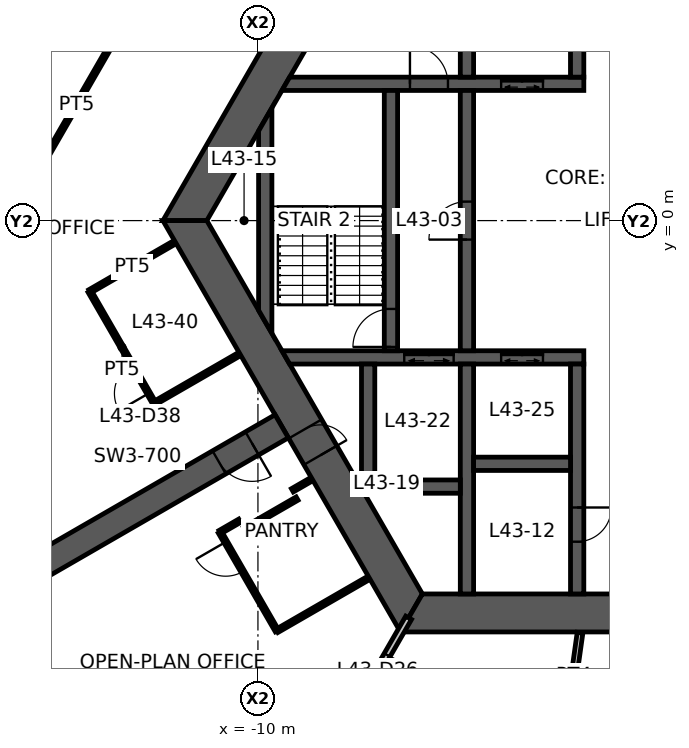
"""IFC4 building model, lengths in metres.
Left out: names, types, materials, properties, quantities, classifications, styles, units other than length and angle.
Written with IfcOpenShell. Run it as: python <this file> out.ifc"""

import sys

from ifc_helpers import new_model, si_unit, direction, frame, frame_2d, origin, place, context, subcontext, project, spatial, polyline, rectangle, outline, extrude, element, fill, save


model = new_model("IFC4")
c1 = context("Model", 3, precision=1e-05, world=origin(), true_north=direction((0.0, 1.0)))
c2 = subcontext(c1, "Body", "Model", "MODEL_VIEW")
j1 = project(units=[si_unit("LENGTHUNIT", "METRE"), si_unit("PLANEANGLEUNIT", "RADIAN")], contexts=[c1])
p1 = place(None, origin())
s1 = spatial("IfcSite", under=j1, at=p1, CompositionType="ELEMENT")
p2 = place(p1, origin())
s2 = spatial("IfcBuilding", under=s1, at=p2, CompositionType="ELEMENT")
p3 = place(p2, frame((0.0, 0.0, 172.1)))
s3 = spatial("IfcBuildingStorey", under=s2, at=p3, CompositionType="ELEMENT", Elevation=172.1)
p4 = place(p3, frame((-5.961, 10.325, 0.0), z_axis=(0.0, 0.0, 1.0), x_axis=(-0.500004296715, -0.866022923061, 0.0)))
e1 = element("IfcWall", 1, at=p4, inside=s3, PredefinedType="SHEAR", context=c2, shape_type="SweptSolid", body=[
    extrude(outline(polyline([(-0.289, -0.5), (4.494, -0.5), (5.494, -0.5), (12.211, -0.5), (11.634, 0.5), (5.494, 0.5), (4.494, 0.5), (0.289, 0.5), (-0.289, -0.5)])), origin(), (0.0, 0.0, 1.0), 3.9),
])
p5 = place(p4, frame((4.494, 0.0, 0.0)))
e2 = element("IfcOpeningElement", 2, at=p5, cuts=e1, PredefinedType="OPENING", context=c2, shape_type="SweptSolid", body=[
    extrude(rectangle(XDim=1.0, YDim=2.1, at=frame_2d((0.5, 1.05))), frame((0.0, 0.51, 0.0), z_axis=(0.0, -1.0, 0.0), x_axis=(1.0, 0.0, 0.0)), (0.0, 0.0, 1.0), 1.02),
])
p6 = place(p3, frame((-11.922, 0.0, 0.0), z_axis=(0.0, 0.0, 1.0), x_axis=(0.500004296715, -0.866022923061, 0.0)))
e3 = element("IfcWall", 3, at=p6, inside=s3, PredefinedType="SHEAR", context=c2, shape_type="SweptSolid", body=[
    extrude(outline(polyline([(-0.289, -0.5), (6.331, -0.5), (7.131, -0.5), (12.211, -0.5), (11.634, 0.5), (7.131, 0.5), (6.331, 0.5), (0.289, 0.5), (-0.289, -0.5)])), origin(), (0.0, 0.0, 1.0), 3.9),
])
p7 = place(p6, frame((6.331, 0.0, 0.0)))
e4 = element("IfcOpeningElement", 4, at=p7, cuts=e3, PredefinedType="OPENING", context=c2, shape_type="SweptSolid", body=[
    extrude(rectangle(XDim=0.8, YDim=2.1, at=frame_2d((0.4, 1.05))), frame((0.0, 0.51, 0.0), z_axis=(0.0, -1.0, 0.0), x_axis=(1.0, 0.0, 0.0)), (0.0, 0.0, 1.0), 1.02),
])
p8 = place(p3, frame((-5.961, -10.325, 0.0), z_axis=(0.0, 0.0, 1.0), x_axis=(1.0, 0.0, 0.0)))
e5 = element("IfcWall", 5, at=p8, inside=s3, PredefinedType="SHEAR", context=c2, shape_type="SweptSolid", body=[
    extrude(outline(polyline([(-0.289, -0.5), (5.461, -0.5), (6.461, -0.5), (12.211, -0.5), (11.634, 0.5), (6.461, 0.5), (5.461, 0.5), (0.289, 0.5), (-0.289, -0.5)])), origin(), (0.0, 0.0, 1.0), 3.9),
])
p9 = place(p8, frame((5.461, 0.0, 0.0)))
e6 = element("IfcOpeningElement", 6, at=p9, cuts=e5, PredefinedType="OPENING", context=c2, shape_type="SweptSolid", body=[
    extrude(rectangle(XDim=1.0, YDim=2.1, at=frame_2d((0.5, 1.05))), frame((0.0, 0.51, 0.0), z_axis=(0.0, -1.0, 0.0), x_axis=(1.0, 0.0, 0.0)), (0.0, 0.0, 1.0), 1.02),
])
p10 = place(p3, frame((-9.375, -5.413, 0.0), z_axis=(0.0, 0.0, 1.0), x_axis=(-0.866032377459, -0.499987921047, 0.0)))
e7 = element("IfcWall", 7, at=p10, inside=s3, PredefinedType="SHEAR", context=c2, shape_type="SweptSolid", body=[
    extrude(rectangle(XDim=7.696, YDim=0.7, at=frame_2d((3.848, 0.0))), origin(), (0.0, 0.0, 1.0), 3.9),
])
p11 = place(p10, frame((0.9, 0.0, 0.0)))
e8 = element("IfcOpeningElement", 8, at=p11, cuts=e7, PredefinedType="OPENING", context=c2, shape_type="SweptSolid", body=[
    extrude(rectangle(XDim=1.0, YDim=2.1, at=frame_2d((0.5, 1.05))), frame((0.0, 0.36, 0.0), z_axis=(0.0, -1.0, 0.0), x_axis=(1.0, 0.0, 0.0)), (0.0, 0.0, 1.0), 0.72),
])
p12 = place(p3, frame((-9.266, 3.6, 0.0), z_axis=(0.0, 0.0, 1.0), x_axis=(1.0, 0.0, 0.0)))
e9 = element("IfcWall", 9, at=p12, inside=s3, PredefinedType="SHEAR", context=c2, shape_type="SweptSolid", body=[
    extrude(outline(polyline([(-0.101, -0.175), (3.266, -0.175), (4.266, -0.175), (5.667, -0.175), (6.767, -0.175), (7.841, -0.175), (7.841, 0.175), (6.767, 0.175), (5.667, 0.175), (4.266, 0.175), (3.266, 0.175), (0.101, 0.175), (-0.101, -0.175)])), origin(), (0.0, 0.0, 1.0), 3.9),
])
p13 = place(p12, frame((3.266, 0.0, 0.0)))
e10 = element("IfcOpeningElement", 10, at=p13, cuts=e9, PredefinedType="OPENING", context=c2, shape_type="SweptSolid", body=[
    extrude(rectangle(XDim=1.0, YDim=2.1, at=frame_2d((0.5, 1.05))), frame((0.0, 0.185, 0.0), z_axis=(0.0, -1.0, 0.0), x_axis=(1.0, 0.0, 0.0)), (0.0, 0.0, 1.0), 0.37),
])
p14 = place(p12, frame((5.667, 0.0, 0.0)))
e11 = element("IfcOpeningElement", 11, at=p14, cuts=e9, PredefinedType="OPENING", context=c2, shape_type="SweptSolid", body=[
    extrude(rectangle(XDim=1.1, YDim=2.1, at=frame_2d((0.55, 1.05))), frame((0.0, 0.185, 0.0), z_axis=(0.0, -1.0, 0.0), x_axis=(1.0, 0.0, 0.0)), (0.0, 0.0, 1.0), 0.37),
])
p15 = place(p3, frame((-9.266, -3.6, 0.0), z_axis=(0.0, 0.0, 1.0), x_axis=(1.0, 0.0, 0.0)))
e12 = element("IfcWall", 12, at=p15, inside=s3, PredefinedType="SHEAR", context=c2, shape_type="SweptSolid", body=[
    extrude(outline(polyline([(0.101, -0.175), (3.116, -0.175), (4.417, -0.175), (5.667, -0.175), (6.767, -0.175), (7.841, -0.175), (7.841, 0.175), (6.767, 0.175), (5.667, 0.175), (4.417, 0.175), (3.116, 0.175), (-0.101, 0.175), (0.101, -0.175)])), origin(), (0.0, 0.0, 1.0), 3.9),
])
p16 = place(p15, frame((5.667, 0.0, 0.0)))
e13 = element("IfcOpeningElement", 13, at=p16, cuts=e12, PredefinedType="OPENING", context=c2, shape_type="SweptSolid", body=[
    extrude(rectangle(XDim=1.1, YDim=2.1, at=frame_2d((0.55, 1.05))), frame((0.0, 0.185, 0.0), z_axis=(0.0, -1.0, 0.0), x_axis=(1.0, 0.0, 0.0)), (0.0, 0.0, 1.0), 0.37),
])
p17 = place(p15, frame((3.116, 0.0, 0.0)))
e14 = element("IfcOpeningElement", 14, at=p17, cuts=e12, PredefinedType="OPENING", context=c2, shape_type="SweptSolid", body=[
    extrude(rectangle(XDim=1.3, YDim=2.1, at=frame_2d((0.65, 1.05))), frame((0.0, 0.185, 0.0), z_axis=(0.0, -1.0, 0.0), x_axis=(1.0, 0.0, 0.0)), (0.0, 0.0, 1.0), 0.37),
])
p18 = place(p3, frame((-1.6, 3.775, 0.0), z_axis=(0.0, 0.0, 1.0), x_axis=(0.0, 1.0, 0.0)))
e15 = element("IfcWall", 15, at=p18, inside=s3, PredefinedType="SHEAR", context=c2, shape_type="SweptSolid", body=[
    extrude(rectangle(XDim=6.05, YDim=0.35, at=frame_2d((3.025, 0.0))), origin(), (0.0, 0.0, 1.0), 3.9),
])
p19 = place(p18, frame((3.775, 0.0, 0.0)))
e16 = element("IfcOpeningElement", 16, at=p19, cuts=e15, PredefinedType="OPENING", context=c2, shape_type="SweptSolid", body=[
    extrude(rectangle(XDim=0.9, YDim=2.1, at=frame_2d((0.45, 1.05))), frame((0.0, 0.185, 0.0), z_axis=(0.0, -1.0, 0.0), x_axis=(1.0, 0.0, 0.0)), (0.0, 0.0, 1.0), 0.37),
])
p20 = place(p3, frame((-1.6, -3.775, 0.0), z_axis=(0.0, 0.0, 1.0), x_axis=(0.0, -1.0, 0.0)))
e17 = element("IfcWall", 17, at=p20, inside=s3, PredefinedType="SHEAR", context=c2, shape_type="SweptSolid", body=[
    extrude(rectangle(XDim=6.05, YDim=0.35, at=frame_2d((3.025, 0.0))), origin(), (0.0, 0.0, 1.0), 3.9),
])
p21 = place(p20, frame((3.775, 0.0, 0.0)))
e18 = element("IfcOpeningElement", 18, at=p21, cuts=e17, PredefinedType="OPENING", context=c2, shape_type="SweptSolid", body=[
    extrude(rectangle(XDim=0.9, YDim=2.1, at=frame_2d((0.45, 1.05))), frame((0.0, 0.185, 0.0), z_axis=(0.0, -1.0, 0.0), x_axis=(1.0, 0.0, 0.0)), (0.0, 0.0, 1.0), 0.37),
])
p22 = place(p3, frame((-4.5, -3.425, 0.0), z_axis=(0.0, 0.0, 1.0), x_axis=(0.0, 1.0, 0.0)))
e19 = element("IfcWall", 19, at=p22, inside=s3, PredefinedType="SHEAR", context=c2, shape_type="SweptSolid", body=[
    extrude(rectangle(XDim=6.85, YDim=0.35, at=frame_2d((3.425, 0.0))), origin(), (0.0, 0.0, 1.0), 3.9),
])
p23 = place(p22, frame((2.925, 0.0, 0.0)))
e20 = element("IfcOpeningElement", 20, at=p23, cuts=e19, PredefinedType="OPENING", context=c2, shape_type="SweptSolid", body=[
    extrude(rectangle(XDim=1.0, YDim=2.1, at=frame_2d((0.5, 1.05))), frame((0.0, 0.185, 0.0), z_axis=(0.0, -1.0, 0.0), x_axis=(1.0, 0.0, 0.0)), (0.0, 0.0, 1.0), 0.37),
])
p24 = place(p3, frame((-6.5, -3.425, 0.0), z_axis=(0.0, 0.0, 1.0), x_axis=(0.0, 1.0, 0.0)))
e21 = element("IfcWall", 21, at=p24, inside=s3, PredefinedType="SHEAR", context=c2, shape_type="SweptSolid", body=[
    extrude(rectangle(XDim=6.85, YDim=0.35, at=frame_2d((3.425, 0.0))), origin(), (0.0, 0.0, 1.0), 3.9),
])
p25 = place(p24, frame((0.1, 0.0, 0.0)))
e22 = element("IfcOpeningElement", 22, at=p25, cuts=e21, PredefinedType="OPENING", context=c2, shape_type="SweptSolid", body=[
    extrude(rectangle(XDim=1.0, YDim=2.1, at=frame_2d((0.5, 1.05))), frame((0.0, 0.185, 0.0), z_axis=(0.0, -1.0, 0.0), x_axis=(1.0, 0.0, 0.0)), (0.0, 0.0, 1.0), 0.37),
])
for number, where, z_axis, x_axis in (
    (23, (-4.5, 3.775, 0.0), (0.0, 0.0, 1.0), (0.0, 1.0, 0.0)),
    (24, (-4.5, -3.775, 0.0), (0.0, 0.0, 1.0), (0.0, -1.0, 0.0)),
):
    element("IfcWall", number, at=place(p3, frame(where, z_axis=z_axis, x_axis=x_axis)), inside=s3, PredefinedType="SHEAR", context=c2, shape_type="SweptSolid", body=[
        extrude(rectangle(XDim=6.05, YDim=0.35, at=frame_2d((3.025, 0.0))), origin(), (0.0, 0.0, 1.0), 3.9),
    ])
p26 = place(p3, frame((-4.325, -6.4, 0.0), z_axis=(0.0, 0.0, 1.0), x_axis=(1.0, 0.0, 0.0)))
e25 = element("IfcWall", 25, at=p26, inside=s3, PredefinedType="SHEAR", context=c2, shape_type="SweptSolid", body=[
    extrude(rectangle(XDim=2.55, YDim=0.35, at=frame_2d((1.275, 0.0))), origin(), (0.0, 0.0, 1.0), 3.9),
])
p27 = place(p3, frame((-6.925, -7.0, 0.0), z_axis=(0.0, 0.0, 1.0), x_axis=(1.0, 0.0, 0.0)))
e26 = element("IfcWall", 26, at=p27, inside=s3, PredefinedType="SHEAR", context=c2, shape_type="SweptSolid", body=[
    extrude(rectangle(XDim=2.25, YDim=0.35, at=frame_2d((1.125, 0.0))), origin(), (0.0, 0.0, 1.0), 3.9),
])
p28 = place(p3, frame((-7.1, -3.775, 0.0), z_axis=(0.0, 0.0, 1.0), x_axis=(0.0, -1.0, 0.0)))
e27 = element("IfcWall", 27, at=p28, inside=s3, PredefinedType="SHEAR", context=c2, shape_type="SweptSolid", body=[
    extrude(outline(polyline([(0.0, -0.175), (3.274, -0.175), (3.4, 0.0), (3.4, 0.175), (0.0, 0.175), (0.0, -0.175)])), origin(), (0.0, 0.0, 1.0), 3.9),
])
p29 = place(p3, frame((-9.808, -2.662, 0.0), z_axis=(0.0, 0.0, 1.0), x_axis=(0.0, 1.0, 0.0)))
e28 = element("IfcWall", 28, at=p29, inside=s3, PredefinedType="SHEAR", context=c2, shape_type="SweptSolid", body=[
    extrude(outline(polyline([(-0.303, -0.175), (5.628, -0.175), (5.021, 0.175), (0.303, 0.175), (-0.303, -0.175)])), origin(), (0.0, 0.0, 1.0), 3.9),
])
p30 = place(p3, frame((-6.035, -10.453, 0.0), z_axis=(0.0, 0.0, 1.0), x_axis=(-0.499989830942, -0.866031274813, 0.0)))
e29 = element("IfcWall", 29, at=p30, inside=s3, PredefinedType="PARTITIONING", context=c2, shape_type="SweptSolid", body=[
    extrude(rectangle(XDim=7.93, YDim=0.175, at=frame_2d((3.965, 0.0))), origin(), (0.0, 0.0, 1.0), 3.05),
])
p31 = place(p30, frame((1.13, 0.0, 0.0)))
e30 = element("IfcOpeningElement", 30, at=p31, cuts=e29, PredefinedType="OPENING", context=c2, shape_type="SweptSolid", body=[
    extrude(rectangle(XDim=1.0, YDim=2.1, at=frame_2d((0.5, 1.05))), frame((0.0, 0.098, 0.0), z_axis=(0.0, -1.0, 0.0), x_axis=(1.0, 0.0, 0.0)), (0.0, 0.0, 1.0), 0.195),
])
p32 = place(p3, frame((-13.941, 4.495, 0.0), z_axis=(0.0, 0.0, 1.0), x_axis=(-0.500033344505, -0.86600615147, 0.0)))
e31 = element("IfcWall", 31, at=p32, inside=s3, PredefinedType="PARTITIONING", context=c2, shape_type="SweptSolid", body=[
    extrude(rectangle(XDim=3.331, YDim=0.1, at=frame_2d((1.666, 0.0))), origin(), (0.0, 0.0, 1.0), 2.95),
])
p33 = place(p3, frame((-14.427, -1.863, 0.0), z_axis=(0.0, 0.0, 1.0), x_axis=(0.866045356598, 0.49996543912, 0.0)))
e32 = element("IfcWall", 32, at=p33, inside=s3, PredefinedType="PARTITIONING", context=c2, shape_type="SweptSolid", body=[
    extrude(rectangle(XDim=2.58, YDim=0.1, at=frame_2d((1.29, 0.0))), origin(), (0.0, 0.0, 1.0), 2.95),
])
p34 = place(p3, frame((-12.726, -4.807, 0.0), z_axis=(0.0, 0.0, 1.0), x_axis=(-0.500062241894, 0.865989465428, 0.0)))
e33 = element("IfcWall", 33, at=p34, inside=s3, PredefinedType="PARTITIONING", context=c2, shape_type="SweptSolid", body=[
    extrude(rectangle(XDim=3.4, YDim=0.1, at=frame_2d((1.7, 0.0))), origin(), (0.0, 0.0, 1.0), 2.95),
])
p35 = place(p34, frame((0.3, 0.0, 0.0)))
e34 = element("IfcOpeningElement", 34, at=p35, cuts=e33, PredefinedType="OPENING", context=c2, shape_type="SweptSolid", body=[
    extrude(rectangle(XDim=0.9, YDim=2.1, at=frame_2d((0.45, 1.05))), frame((0.0, 0.06, 0.0), z_axis=(0.0, -1.0, 0.0), x_axis=(1.0, 0.0, 0.0)), (0.0, 0.0, 1.0), 0.12),
])
p36 = place(p3, frame((-10.492, -3.517, 0.0), z_axis=(0.0, 0.0, 1.0), x_axis=(-0.866021702275, -0.500006411147, 0.0)))
e35 = element("IfcWall", 35, at=p36, inside=s3, PredefinedType="PARTITIONING", context=c2, shape_type="SweptSolid", body=[
    extrude(rectangle(XDim=2.58, YDim=0.1, at=frame_2d((1.29, 0.0))), origin(), (0.0, 0.0, 1.0), 2.95),
])
p37 = place(p3, frame((-11.0, -8.198, 0.0), z_axis=(0.0, 0.0, 1.0), x_axis=(0.866131372301, 0.499816412211, 0.0)))
e36 = element("IfcWall", 36, at=p37, inside=s3, PredefinedType="PARTITIONING", context=c2, shape_type="SweptSolid", body=[
    extrude(rectangle(XDim=0.6, YDim=0.1, at=frame_2d((0.3, 0.0))), origin(), (0.0, 0.0, 1.0), 2.95),
])
p38 = place(p3, frame((-10.355, -8.115, 0.0), z_axis=(0.0, 0.0, 1.0), x_axis=(0.866094119867, 0.499880961361, 0.0)))
e37 = element("IfcWall", 37, at=p38, inside=s3, PredefinedType="PARTITIONING", context=c2, shape_type="SweptSolid", body=[
    extrude(rectangle(XDim=1.6, YDim=0.1, at=frame_2d((0.8, 0.0))), origin(), (0.0, 0.0, 1.0), 2.95),
])
p39 = place(p3, frame((-9.5, -10.796, 0.0), z_axis=(0.0, 0.0, 1.0), x_axis=(-0.499990139034, 0.866031096941, 0.0)))
e38 = element("IfcWall", 38, at=p39, inside=s3, PredefinedType="PARTITIONING", context=c2, shape_type="SweptSolid", body=[
    extrude(rectangle(XDim=3.0, YDim=0.1, at=frame_2d((1.5, 0.0))), origin(), (0.0, 0.0, 1.0), 2.95),
])
p40 = place(p39, frame((1.8, 0.0, 0.0)))
e39 = element("IfcOpeningElement", 39, at=p40, cuts=e38, PredefinedType="OPENING", context=c2, shape_type="SweptSolid", body=[
    extrude(rectangle(XDim=0.9, YDim=2.1, at=frame_2d((0.45, 1.05))), frame((0.0, 0.06, 0.0), z_axis=(0.0, -1.0, 0.0), x_axis=(1.0, 0.0, 0.0)), (0.0, 0.0, 1.0), 0.12),
])
p41 = place(p3, frame((-9.094, -7.098, 0.0), z_axis=(0.0, 0.0, 1.0), x_axis=(0.865954211699, 0.50012328804, 0.0)))
e40 = element("IfcWall", 40, at=p41, inside=s3, PredefinedType="PARTITIONING", context=c2, shape_type="SweptSolid", body=[
    extrude(rectangle(XDim=0.58, YDim=0.1, at=frame_2d((0.29, 0.0))), origin(), (0.0, 0.0, 1.0), 2.95),
])
p42 = place(p3, frame((-7.092, -9.406, 0.0), z_axis=(0.0, 0.0, 1.0), x_axis=(-0.86603494908, -0.499983466698, 0.0)))
e41 = element("IfcWall", 41, at=p42, inside=s3, PredefinedType="PARTITIONING", context=c2, shape_type="SweptSolid", body=[
    extrude(rectangle(XDim=2.78, YDim=0.1, at=frame_2d((1.39, 0.0))), origin(), (0.0, 0.0, 1.0), 2.95),
])
p43 = place(p3, frame((-1.844, -13.125, 0.0), z_axis=(0.0, 0.0, 1.0), x_axis=(0.139119980631, 0.990275532864, 0.0)))
e42 = element("IfcWall", 42, at=p43, inside=s3, PredefinedType="PARTITIONING", context=c2, shape_type="SweptSolid", body=[
    extrude(rectangle(XDim=2.302, YDim=0.15, at=frame_2d((1.151, 0.0))), origin(), (0.0, 0.0, 1.0), 2.95),
])
p44 = place(p7, origin())
e43 = element("IfcDoor", 43, at=p44, inside=s3, OperationType="SINGLE_SWING_RIGHT", PredefinedType="DOOR", context=c2, shape_type="SweptSolid", body=[
    extrude(rectangle(XDim=0.8, YDim=2.1, at=frame_2d((0.4, 1.05))), frame((0.0, 0.025, 0.0), z_axis=(0.0, -1.0, 0.0), x_axis=(1.0, 0.0, 0.0)), (0.0, 0.0, 1.0), 0.05),
])
fill(e4, e43)
p45 = place(p23, origin())
e44 = element("IfcDoor", 44, at=p45, inside=s3, OperationType="SINGLE_SWING_LEFT", PredefinedType="DOOR", context=c2, shape_type="SweptSolid", body=[
    extrude(rectangle(XDim=1.0, YDim=2.1, at=frame_2d((0.5, 1.05))), frame((0.0, 0.025, 0.0), z_axis=(0.0, -1.0, 0.0), x_axis=(1.0, 0.0, 0.0)), (0.0, 0.0, 1.0), 0.05),
])
fill(e20, e44)
p46 = place(p25, origin())
e45 = element("IfcDoor", 45, at=p46, inside=s3, OperationType="SINGLE_SWING_LEFT", PredefinedType="DOOR", context=c2, shape_type="SweptSolid", body=[
    extrude(rectangle(XDim=1.0, YDim=2.1, at=frame_2d((0.5, 1.05))), frame((0.0, 0.025, 0.0), z_axis=(0.0, -1.0, 0.0), x_axis=(1.0, 0.0, 0.0)), (0.0, 0.0, 1.0), 0.05),
])
fill(e22, e45)
p47 = place(p13, origin())
e46 = element("IfcDoor", 46, at=p47, inside=s3, OperationType="SINGLE_SWING_LEFT", PredefinedType="DOOR", context=c2, shape_type="SweptSolid", body=[
    extrude(rectangle(XDim=1.0, YDim=2.1, at=frame_2d((0.5, 1.05))), frame((0.0, 0.025, 0.0), z_axis=(0.0, -1.0, 0.0), x_axis=(1.0, 0.0, 0.0)), (0.0, 0.0, 1.0), 0.05),
])
fill(e10, e46)
p48 = place(p21, origin())
e47 = element("IfcDoor", 47, at=p48, inside=s3, OperationType="SINGLE_SWING_LEFT", PredefinedType="DOOR", context=c2, shape_type="SweptSolid", body=[
    extrude(rectangle(XDim=0.9, YDim=2.1, at=frame_2d((0.45, 1.05))), frame((0.0, 0.025, 0.0), z_axis=(0.0, -1.0, 0.0), x_axis=(1.0, 0.0, 0.0)), (0.0, 0.0, 1.0), 0.05),
])
fill(e18, e47)
p49 = place(p11, origin())
e48 = element("IfcDoor", 48, at=p49, inside=s3, OperationType="SINGLE_SWING_LEFT", PredefinedType="DOOR", context=c2, shape_type="SweptSolid", body=[
    extrude(rectangle(XDim=1.0, YDim=2.1, at=frame_2d((0.5, 1.05))), frame((0.0, 0.025, 0.0), z_axis=(0.0, -1.0, 0.0), x_axis=(1.0, 0.0, 0.0)), (0.0, 0.0, 1.0), 0.05),
])
fill(e8, e48)
p50 = place(p31, origin())
e49 = element("IfcDoor", 49, at=p50, inside=s3, OperationType="SINGLE_SWING_LEFT", PredefinedType="DOOR", context=c2, shape_type="SweptSolid", body=[
    extrude(rectangle(XDim=1.0, YDim=2.1, at=frame_2d((0.5, 1.05))), frame((0.0, 0.025, 0.0), z_axis=(0.0, -1.0, 0.0), x_axis=(1.0, 0.0, 0.0)), (0.0, 0.0, 1.0), 0.05),
])
fill(e30, e49)
p51 = place(p35, origin())
e50 = element("IfcDoor", 50, at=p51, inside=s3, OperationType="SINGLE_SWING_LEFT", PredefinedType="DOOR", context=c2, shape_type="SweptSolid", body=[
    extrude(rectangle(XDim=0.9, YDim=2.1, at=frame_2d((0.45, 1.05))), frame((0.0, 0.025, 0.0), z_axis=(0.0, -1.0, 0.0), x_axis=(1.0, 0.0, 0.0)), (0.0, 0.0, 1.0), 0.05),
])
fill(e34, e50)
p52 = place(p40, origin())
e51 = element("IfcDoor", 51, at=p52, inside=s3, OperationType="SINGLE_SWING_RIGHT", PredefinedType="DOOR", context=c2, shape_type="SweptSolid", body=[
    extrude(rectangle(XDim=0.9, YDim=2.1, at=frame_2d((0.45, 1.05))), frame((0.0, 0.025, 0.0), z_axis=(0.0, -1.0, 0.0), x_axis=(1.0, 0.0, 0.0)), (0.0, 0.0, 1.0), 0.05),
])
fill(e39, e51)
p53 = place(p14, origin())
e52 = element("IfcDoor", 52, at=p53, inside=s3, OperationType="DOUBLE_DOOR_SLIDING", PredefinedType="DOOR", context=c2, shape_type="SweptSolid", body=[
    extrude(rectangle(XDim=1.1, YDim=2.1, at=frame_2d((0.55, 1.05))), frame((0.0, 0.025, 0.0), z_axis=(0.0, -1.0, 0.0), x_axis=(1.0, 0.0, 0.0)), (0.0, 0.0, 1.0), 0.05),
])
fill(e11, e52)
p54 = place(p16, origin())
e53 = element("IfcDoor", 53, at=p54, inside=s3, OperationType="DOUBLE_DOOR_SLIDING", PredefinedType="DOOR", context=c2, shape_type="SweptSolid", body=[
    extrude(rectangle(XDim=1.1, YDim=2.1, at=frame_2d((0.55, 1.05))), frame((0.0, 0.025, 0.0), z_axis=(0.0, -1.0, 0.0), x_axis=(1.0, 0.0, 0.0)), (0.0, 0.0, 1.0), 0.05),
])
fill(e13, e53)
p55 = place(p17, origin())
e54 = element("IfcDoor", 54, at=p55, inside=s3, OperationType="DOUBLE_DOOR_SLIDING", PredefinedType="DOOR", context=c2, shape_type="SweptSolid", body=[
    extrude(rectangle(XDim=1.3, YDim=2.1, at=frame_2d((0.65, 1.05))), frame((0.0, 0.025, 0.0), z_axis=(0.0, -1.0, 0.0), x_axis=(1.0, 0.0, 0.0)), (0.0, 0.0, 1.0), 0.05),
])
fill(e14, e54)
save(model, sys.argv[1])
